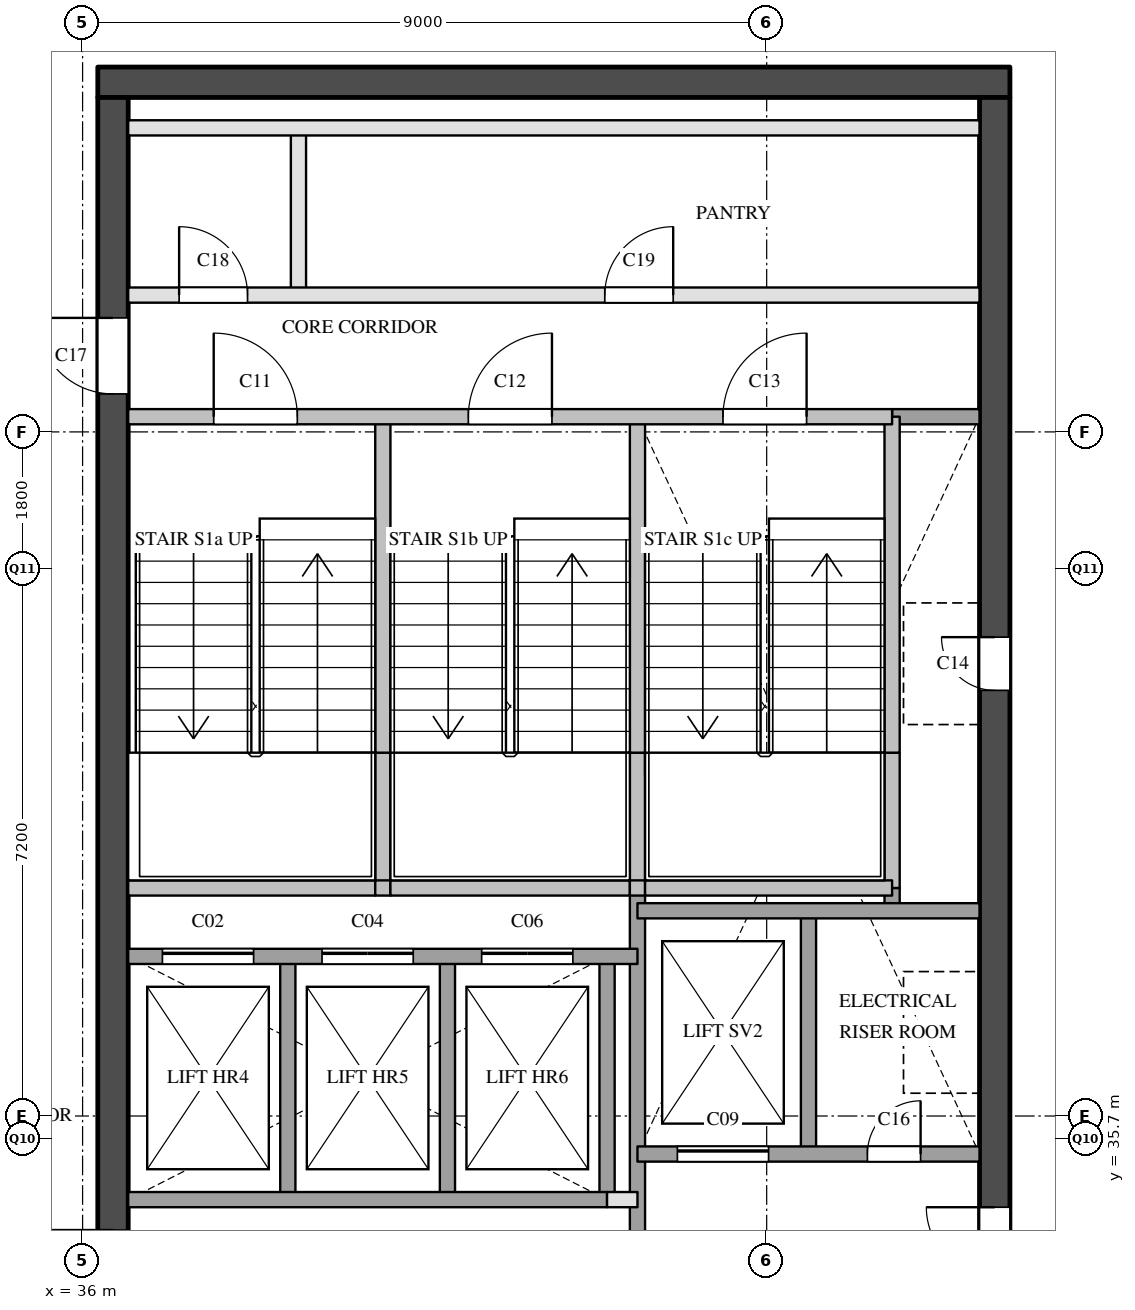
"""IFC4 building model, lengths in metres.
Left out: names, types, materials, properties, quantities, classifications, styles, units other than length and angle.
Written with IfcOpenShell. Run it as: python <this file> out.ifc"""

import sys

from ifc_helpers import new_model, si_unit, direction, frame, frame_2d, origin, place, context, subcontext, project, spatial, rectangle, extrude, element, fill, save


model = new_model("IFC4")
c1 = context("Model", 3, precision=1e-05, world=origin(), true_north=direction((0.0, 1.0)))
c2 = subcontext(c1, "Body", "Model", "MODEL_VIEW")
j1 = project(units=[si_unit("LENGTHUNIT", "METRE"), si_unit("PLANEANGLEUNIT", "RADIAN")], contexts=[c1])
p1 = place(None, origin())
s1 = spatial("IfcSite", under=j1, at=p1, CompositionType="ELEMENT")
p2 = place(p1, origin())
s2 = spatial("IfcBuilding", under=s1, at=p2, CompositionType="ELEMENT")
p3 = place(p2, frame((0.0, 0.0, 203.3)))
s3 = spatial("IfcBuildingStorey", under=s2, at=p3, CompositionType="ELEMENT", Elevation=203.3)
p4 = place(p3, frame((36.2, 49.6, 0.0), z_axis=(0.0, 0.0, 1.0), x_axis=(1.0, 0.0, 0.0)))
e1 = element("IfcWall", 1, at=p4, inside=s3, PredefinedType="SHEAR", context=c2, shape_type="SweptSolid", body=[
    extrude(rectangle(XDim=12.0, YDim=0.4, at=frame_2d((6.0, 0.0))), origin(), (0.0, 0.0, 1.0), 3.6),
])
p5 = place(p3, frame((36.4, 29.1, 0.0), z_axis=(0.0, 0.0, 1.0), x_axis=(0.0, 1.0, 0.0)))
e2 = element("IfcWall", 2, at=p5, inside=s3, PredefinedType="SHEAR", context=c2, shape_type="SweptSolid", body=[
    extrude(rectangle(XDim=20.3, YDim=0.4, at=frame_2d((10.15, 0.0))), origin(), (0.0, 0.0, 1.0), 3.6),
])
p6 = place(p5, frame((3.6, 0.0, 0.0)))
e3 = element("IfcOpeningElement", 3, at=p6, cuts=e2, PredefinedType="OPENING", context=c2, shape_type="SweptSolid", body=[
    extrude(rectangle(XDim=1.8, YDim=2.1, at=frame_2d((0.9, 1.05))), frame((0.0, 0.21, 0.0), z_axis=(0.0, -1.0, 0.0), x_axis=(1.0, 0.0, 0.0)), (0.0, 0.0, 1.0), 0.42),
])
p7 = place(p5, frame((16.4, 0.0, 0.0)))
e4 = element("IfcOpeningElement", 4, at=p7, cuts=e2, PredefinedType="OPENING", context=c2, shape_type="SweptSolid", body=[
    extrude(rectangle(XDim=1.0, YDim=2.1, at=frame_2d((0.5, 1.05))), frame((0.0, 0.21, 0.0), z_axis=(0.0, -1.0, 0.0), x_axis=(1.0, 0.0, 0.0)), (0.0, 0.0, 1.0), 0.42),
])
p8 = place(p3, frame((48.0, 29.1, 0.0), z_axis=(0.0, 0.0, 1.0), x_axis=(0.0, 1.0, 0.0)))
e5 = element("IfcWall", 5, at=p8, inside=s3, PredefinedType="SHEAR", context=c2, shape_type="SweptSolid", body=[
    extrude(rectangle(XDim=20.3, YDim=0.4, at=frame_2d((10.15, 0.0))), origin(), (0.0, 0.0, 1.0), 3.6),
])
p9 = place(p8, frame((12.5, 0.0, 0.0)))
e6 = element("IfcOpeningElement", 6, at=p9, cuts=e5, PredefinedType="OPENING", context=c2, shape_type="SweptSolid", body=[
    extrude(rectangle(XDim=0.7, YDim=2.1, at=frame_2d((0.35, 1.05))), frame((0.0, 0.21, 0.0), z_axis=(0.0, -1.0, 0.0), x_axis=(1.0, 0.0, 0.0)), (0.0, 0.0, 1.0), 0.42),
])
p10 = place(p8, frame((3.9, 0.0, 0.0)))
e7 = element("IfcOpeningElement", 7, at=p10, cuts=e5, PredefinedType="OPENING", context=c2, shape_type="SweptSolid", body=[
    extrude(rectangle(XDim=1.8, YDim=2.1, at=frame_2d((0.9, 1.05))), frame((0.0, 0.21, 0.0), z_axis=(0.0, -1.0, 0.0), x_axis=(1.0, 0.0, 0.0)), (0.0, 0.0, 1.0), 0.42),
])
p11 = place(p3, frame((38.7, 34.9, 0.0), z_axis=(0.0, 0.0, 1.0), x_axis=(0.0, 1.0, 0.0)))
e8 = element("IfcWall", 8, at=p11, inside=s3, PredefinedType="SOLIDWALL", context=c2, shape_type="SweptSolid", body=[
    extrude(rectangle(XDim=3.2, YDim=0.2, at=frame_2d((1.6, 0.0))), origin(), (0.0, 0.0, 1.0), 3.6),
])
p12 = place(p3, frame((38.84, 46.8, 0.0), z_axis=(0.0, 0.0, 1.0), x_axis=(0.0, 1.0, 0.0)))
e9 = element("IfcWall", 9, at=p12, inside=s3, PredefinedType="PARTITIONING", context=c2, shape_type="SweptSolid", body=[
    extrude(rectangle(XDim=2.2, YDim=0.2, at=frame_2d((1.1, 0.0))), origin(), (0.0, 0.0, 1.0), 3.6),
])
p13 = place(p3, frame((39.95, 39.0, 0.0), z_axis=(0.0, 0.0, 1.0), x_axis=(0.0, 1.0, 0.0)))
e10 = element("IfcWall", 10, at=p13, inside=s3, PredefinedType="SOLIDWALL", context=c2, shape_type="SweptSolid", body=[
    extrude(rectangle(XDim=1.78, YDim=0.2, at=frame_2d((0.89, 0.0))), origin(), (0.0, 0.0, 1.0), 3.6),
])
p14 = place(p3, frame((39.95, 40.78, 0.0), z_axis=(0.0, 0.0, 1.0), x_axis=(0.0, 1.0, 0.0)))
e11 = element("IfcWall", 11, at=p14, inside=s3, PredefinedType="SOLIDWALL", context=c2, shape_type="SweptSolid", body=[
    extrude(rectangle(XDim=4.42, YDim=0.2, at=frame_2d((2.21, 0.0))), origin(), (0.0, 0.0, 1.0), 3.6),
])
for number, where, z_axis, x_axis in (
    (12, (40.8, 34.9, 0.0), (0.0, 0.0, 1.0), (0.0, 1.0, 0.0)),
    (13, (42.9, 34.9, 0.0), (0.0, 0.0, 1.0), (0.0, 1.0, 0.0)),
):
    element("IfcWall", number, at=place(p3, frame(where, z_axis=z_axis, x_axis=x_axis)), inside=s3, PredefinedType="SOLIDWALL", context=c2, shape_type="SweptSolid", body=[
        extrude(rectangle(XDim=3.2, YDim=0.2, at=frame_2d((1.6, 0.0))), origin(), (0.0, 0.0, 1.0), 3.6),
    ])
p15 = place(p3, frame((43.3, 29.1, 0.0), z_axis=(0.0, 0.0, 1.0), x_axis=(0.0, 1.0, 0.0)))
e14 = element("IfcWall", 14, at=p15, inside=s3, PredefinedType="SOLIDWALL", context=c2, shape_type="SweptSolid", body=[
    extrude(rectangle(XDim=9.9, YDim=0.2, at=frame_2d((4.95, 0.0))), origin(), (0.0, 0.0, 1.0), 3.6),
])
p16 = place(p3, frame((43.3, 39.0, 0.0), z_axis=(0.0, 0.0, 1.0), x_axis=(0.0, 1.0, 0.0)))
e15 = element("IfcWall", 15, at=p16, inside=s3, PredefinedType="SOLIDWALL", context=c2, shape_type="SweptSolid", body=[
    extrude(rectangle(XDim=1.78, YDim=0.2, at=frame_2d((0.89, 0.0))), origin(), (0.0, 0.0, 1.0), 3.6),
])
p17 = place(p3, frame((43.3, 40.78, 0.0), z_axis=(0.0, 0.0, 1.0), x_axis=(0.0, 1.0, 0.0)))
e16 = element("IfcWall", 16, at=p17, inside=s3, PredefinedType="SOLIDWALL", context=c2, shape_type="SweptSolid", body=[
    extrude(rectangle(XDim=4.42, YDim=0.2, at=frame_2d((2.21, 0.0))), origin(), (0.0, 0.0, 1.0), 3.6),
])
p18 = place(p3, frame((45.55, 35.5, 0.0), z_axis=(0.0, 0.0, 1.0), x_axis=(0.0, 1.0, 0.0)))
e17 = element("IfcWall", 17, at=p18, inside=s3, PredefinedType="SOLIDWALL", context=c2, shape_type="SweptSolid", body=[
    extrude(rectangle(XDim=3.2, YDim=0.2, at=frame_2d((1.6, 0.0))), origin(), (0.0, 0.0, 1.0), 3.6),
])
p19 = place(p3, frame((46.65, 38.7, 0.0), z_axis=(0.0, 0.0, 1.0), x_axis=(0.0, 1.0, 0.0)))
e18 = element("IfcWall", 18, at=p19, inside=s3, PredefinedType="SOLIDWALL", context=c2, shape_type="SweptSolid", body=[
    extrude(rectangle(XDim=0.3, YDim=0.2, at=frame_2d((0.15, 0.0))), origin(), (0.0, 0.0, 1.0), 3.6),
])
p20 = place(p3, frame((46.65, 39.0, 0.0), z_axis=(0.0, 0.0, 1.0), x_axis=(0.0, 1.0, 0.0)))
e19 = element("IfcWall", 19, at=p20, inside=s3, PredefinedType="SOLIDWALL", context=c2, shape_type="SweptSolid", body=[
    extrude(rectangle(XDim=1.78, YDim=0.2, at=frame_2d((0.89, 0.0))), origin(), (0.0, 0.0, 1.0), 3.6),
])
p21 = place(p3, frame((46.65, 40.78, 0.0), z_axis=(0.0, 0.0, 1.0), x_axis=(0.0, 1.0, 0.0)))
e20 = element("IfcWall", 20, at=p21, inside=s3, PredefinedType="SOLIDWALL", context=c2, shape_type="SweptSolid", body=[
    extrude(rectangle(XDim=4.42, YDim=0.2, at=frame_2d((2.21, 0.0))), origin(), (0.0, 0.0, 1.0), 3.6),
])
p22 = place(p3, frame((42.9, 34.9, 0.0), z_axis=(0.0, 0.0, 1.0), x_axis=(1.0, 0.0, 0.0)))
e21 = element("IfcWall", 21, at=p22, inside=s3, PredefinedType="PARTITIONING", context=c2, shape_type="SweptSolid", body=[
    extrude(rectangle(XDim=0.4, YDim=0.2, at=frame_2d((0.2, 0.0))), origin(), (0.0, 0.0, 1.0), 3.6),
])
p23 = place(p3, frame((36.6, 34.9, 0.0), z_axis=(0.0, 0.0, 1.0), x_axis=(1.0, 0.0, 0.0)))
e22 = element("IfcWall", 22, at=p23, inside=s3, PredefinedType="SOLIDWALL", context=c2, shape_type="SweptSolid", body=[
    extrude(rectangle(XDim=6.3, YDim=0.2, at=frame_2d((3.15, 0.0))), origin(), (0.0, 0.0, 1.0), 3.6),
])
p24 = place(p3, frame((43.3, 35.5, 0.0), z_axis=(0.0, 0.0, 1.0), x_axis=(1.0, 0.0, 0.0)))
e23 = element("IfcWall", 23, at=p24, inside=s3, PredefinedType="SOLIDWALL", context=c2, shape_type="SweptSolid", body=[
    extrude(rectangle(XDim=4.5, YDim=0.2, at=frame_2d((2.25, 0.0))), origin(), (0.0, 0.0, 1.0), 3.6),
])
p25 = place(p24, frame((0.525, 0.0, 0.0)))
e24 = element("IfcOpeningElement", 24, at=p25, cuts=e23, PredefinedType="OPENING", context=c2, shape_type="SweptSolid", body=[
    extrude(rectangle(XDim=1.2, YDim=2.1, at=frame_2d((0.6, 1.05))), frame((0.0, 0.11, 0.0), z_axis=(0.0, -1.0, 0.0), x_axis=(1.0, 0.0, 0.0)), (0.0, 0.0, 1.0), 0.22),
])
p26 = place(p24, frame((3.025, 0.0, 0.0)))
e25 = element("IfcOpeningElement", 25, at=p26, cuts=e23, PredefinedType="OPENING", context=c2, shape_type="SweptSolid", body=[
    extrude(rectangle(XDim=0.7, YDim=2.1, at=frame_2d((0.35, 1.05))), frame((0.0, 0.11, 0.0), z_axis=(0.0, -1.0, 0.0), x_axis=(1.0, 0.0, 0.0)), (0.0, 0.0, 1.0), 0.22),
])
p27 = place(p3, frame((36.6, 38.1, 0.0), z_axis=(0.0, 0.0, 1.0), x_axis=(1.0, 0.0, 0.0)))
e26 = element("IfcWall", 26, at=p27, inside=s3, PredefinedType="SOLIDWALL", context=c2, shape_type="SweptSolid", body=[
    extrude(rectangle(XDim=6.7, YDim=0.2, at=frame_2d((3.35, 0.0))), origin(), (0.0, 0.0, 1.0), 3.6),
])
p28 = place(p27, frame((0.45, 0.0, 0.0)))
e27 = element("IfcOpeningElement", 27, at=p28, cuts=e26, PredefinedType="OPENING", context=c2, shape_type="SweptSolid", body=[
    extrude(rectangle(XDim=1.2, YDim=2.1, at=frame_2d((0.6, 1.05))), frame((0.0, 0.11, 0.0), z_axis=(0.0, -1.0, 0.0), x_axis=(1.0, 0.0, 0.0)), (0.0, 0.0, 1.0), 0.22),
])
p29 = place(p27, frame((2.55, 0.0, 0.0)))
e28 = element("IfcOpeningElement", 28, at=p29, cuts=e26, PredefinedType="OPENING", context=c2, shape_type="SweptSolid", body=[
    extrude(rectangle(XDim=1.2, YDim=2.1, at=frame_2d((0.6, 1.05))), frame((0.0, 0.11, 0.0), z_axis=(0.0, -1.0, 0.0), x_axis=(1.0, 0.0, 0.0)), (0.0, 0.0, 1.0), 0.22),
])
p30 = place(p27, frame((4.65, 0.0, 0.0)))
e29 = element("IfcOpeningElement", 29, at=p30, cuts=e26, PredefinedType="OPENING", context=c2, shape_type="SweptSolid", body=[
    extrude(rectangle(XDim=1.2, YDim=2.1, at=frame_2d((0.6, 1.05))), frame((0.0, 0.11, 0.0), z_axis=(0.0, -1.0, 0.0), x_axis=(1.0, 0.0, 0.0)), (0.0, 0.0, 1.0), 0.22),
])
p31 = place(p3, frame((43.3, 38.7, 0.0), z_axis=(0.0, 0.0, 1.0), x_axis=(1.0, 0.0, 0.0)))
e30 = element("IfcWall", 30, at=p31, inside=s3, PredefinedType="SOLIDWALL", context=c2, shape_type="SweptSolid", body=[
    extrude(rectangle(XDim=4.5, YDim=0.2, at=frame_2d((2.25, 0.0))), origin(), (0.0, 0.0, 1.0), 3.6),
])
p32 = place(p3, frame((36.6, 39.0, 0.0), z_axis=(0.0, 0.0, 1.0), x_axis=(1.0, 0.0, 0.0)))
e31 = element("IfcWall", 31, at=p32, inside=s3, PredefinedType="SOLIDWALL", context=c2, shape_type="SweptSolid", body=[
    extrude(rectangle(XDim=3.25, YDim=0.2, at=frame_2d((1.625, 0.0))), origin(), (0.0, 0.0, 1.0), 3.6),
])
p33 = place(p3, frame((39.85, 39.0, 0.0), z_axis=(0.0, 0.0, 1.0), x_axis=(1.0, 0.0, 0.0)))
e32 = element("IfcWall", 32, at=p33, inside=s3, PredefinedType="SOLIDWALL", context=c2, shape_type="SweptSolid", body=[
    extrude(rectangle(XDim=0.2, YDim=0.2, at=frame_2d((0.1, 0.0))), origin(), (0.0, 0.0, 1.0), 3.6),
])
p34 = place(p3, frame((40.05, 39.0, 0.0), z_axis=(0.0, 0.0, 1.0), x_axis=(1.0, 0.0, 0.0)))
e33 = element("IfcWall", 33, at=p34, inside=s3, PredefinedType="SOLIDWALL", context=c2, shape_type="SweptSolid", body=[
    extrude(rectangle(XDim=3.15, YDim=0.2, at=frame_2d((1.575, 0.0))), origin(), (0.0, 0.0, 1.0), 3.6),
])
p35 = place(p3, frame((43.2, 39.0, 0.0), z_axis=(0.0, 0.0, 1.0), x_axis=(1.0, 0.0, 0.0)))
e34 = element("IfcWall", 34, at=p35, inside=s3, PredefinedType="SOLIDWALL", context=c2, shape_type="SweptSolid", body=[
    extrude(rectangle(XDim=0.2, YDim=0.2, at=frame_2d((0.1, 0.0))), origin(), (0.0, 0.0, 1.0), 3.6),
])
p36 = place(p3, frame((43.4, 39.0, 0.0), z_axis=(0.0, 0.0, 1.0), x_axis=(1.0, 0.0, 0.0)))
e35 = element("IfcWall", 35, at=p36, inside=s3, PredefinedType="SOLIDWALL", context=c2, shape_type="SweptSolid", body=[
    extrude(rectangle(XDim=3.25, YDim=0.2, at=frame_2d((1.625, 0.0))), origin(), (0.0, 0.0, 1.0), 3.6),
])
p37 = place(p3, frame((46.65, 45.2, 0.0), z_axis=(0.0, 0.0, 1.0), x_axis=(1.0, 0.0, 0.0)))
e36 = element("IfcWall", 36, at=p37, inside=s3, PredefinedType="SOLIDWALL", context=c2, shape_type="SweptSolid", body=[
    extrude(rectangle(XDim=1.15, YDim=0.2, at=frame_2d((0.575, 0.0))), origin(), (0.0, 0.0, 1.0), 3.6),
])
p38 = place(p3, frame((36.6, 45.2, 0.0), z_axis=(0.0, 0.0, 1.0), x_axis=(1.0, 0.0, 0.0)))
e37 = element("IfcWall", 37, at=p38, inside=s3, PredefinedType="SOLIDWALL", context=c2, shape_type="SweptSolid", body=[
    extrude(rectangle(XDim=10.05, YDim=0.2, at=frame_2d((5.025, 0.0))), origin(), (0.0, 0.0, 1.0), 3.6),
])
p39 = place(p38, frame((1.125, 0.0, 0.0)))
e38 = element("IfcOpeningElement", 38, at=p39, cuts=e37, PredefinedType="OPENING", context=c2, shape_type="SweptSolid", body=[
    extrude(rectangle(XDim=1.1, YDim=2.1, at=frame_2d((0.55, 1.05))), frame((0.0, 0.11, 0.0), z_axis=(0.0, -1.0, 0.0), x_axis=(1.0, 0.0, 0.0)), (0.0, 0.0, 1.0), 0.22),
])
p40 = place(p38, frame((4.475, 0.0, 0.0)))
e39 = element("IfcOpeningElement", 39, at=p40, cuts=e37, PredefinedType="OPENING", context=c2, shape_type="SweptSolid", body=[
    extrude(rectangle(XDim=1.1, YDim=2.1, at=frame_2d((0.55, 1.05))), frame((0.0, 0.11, 0.0), z_axis=(0.0, -1.0, 0.0), x_axis=(1.0, 0.0, 0.0)), (0.0, 0.0, 1.0), 0.22),
])
p41 = place(p38, frame((7.825, 0.0, 0.0)))
e40 = element("IfcOpeningElement", 40, at=p41, cuts=e37, PredefinedType="OPENING", context=c2, shape_type="SweptSolid", body=[
    extrude(rectangle(XDim=1.1, YDim=2.1, at=frame_2d((0.55, 1.05))), frame((0.0, 0.11, 0.0), z_axis=(0.0, -1.0, 0.0), x_axis=(1.0, 0.0, 0.0)), (0.0, 0.0, 1.0), 0.22),
])
p42 = place(p3, frame((36.6, 46.8, 0.0), z_axis=(0.0, 0.0, 1.0), x_axis=(1.0, 0.0, 0.0)))
e41 = element("IfcWall", 41, at=p42, inside=s3, PredefinedType="PARTITIONING", context=c2, shape_type="SweptSolid", body=[
    extrude(rectangle(XDim=11.2, YDim=0.2, at=frame_2d((5.6, 0.0))), origin(), (0.0, 0.0, 1.0), 3.6),
])
p43 = place(p42, frame((0.67, 0.0, 0.0)))
e42 = element("IfcOpeningElement", 42, at=p43, cuts=e41, PredefinedType="OPENING", context=c2, shape_type="SweptSolid", body=[
    extrude(rectangle(XDim=0.9, YDim=2.1, at=frame_2d((0.45, 1.05))), frame((0.0, 0.11, 0.0), z_axis=(0.0, -1.0, 0.0), x_axis=(1.0, 0.0, 0.0)), (0.0, 0.0, 1.0), 0.22),
])
p44 = place(p42, frame((6.27, 0.0, 0.0)))
e43 = element("IfcOpeningElement", 43, at=p44, cuts=e41, PredefinedType="OPENING", context=c2, shape_type="SweptSolid", body=[
    extrude(rectangle(XDim=0.9, YDim=2.1, at=frame_2d((0.45, 1.05))), frame((0.0, 0.11, 0.0), z_axis=(0.0, -1.0, 0.0), x_axis=(1.0, 0.0, 0.0)), (0.0, 0.0, 1.0), 0.22),
])
p45 = place(p3, frame((36.6, 49.0, 0.0), z_axis=(0.0, 0.0, 1.0), x_axis=(1.0, 0.0, 0.0)))
e44 = element("IfcWall", 44, at=p45, inside=s3, PredefinedType="PARTITIONING", context=c2, shape_type="SweptSolid", body=[
    extrude(rectangle(XDim=11.2, YDim=0.2, at=frame_2d((5.6, 0.0))), origin(), (0.0, 0.0, 1.0), 3.6),
])
p46 = place(p28, origin())
e45 = element("IfcDoor", 45, at=p46, inside=s3, OperationType="SLIDING_TO_LEFT", PredefinedType="DOOR", context=c2, shape_type="SweptSolid", body=[
    extrude(rectangle(XDim=1.2, YDim=2.1, at=frame_2d((0.6, 1.05))), frame((0.0, 0.025, 0.0), z_axis=(0.0, -1.0, 0.0), x_axis=(1.0, 0.0, 0.0)), (0.0, 0.0, 1.0), 0.05),
])
fill(e27, e45)
p47 = place(p29, origin())
e46 = element("IfcDoor", 46, at=p47, inside=s3, OperationType="SLIDING_TO_LEFT", PredefinedType="DOOR", context=c2, shape_type="SweptSolid", body=[
    extrude(rectangle(XDim=1.2, YDim=2.1, at=frame_2d((0.6, 1.05))), frame((0.0, 0.025, 0.0), z_axis=(0.0, -1.0, 0.0), x_axis=(1.0, 0.0, 0.0)), (0.0, 0.0, 1.0), 0.05),
])
fill(e28, e46)
p48 = place(p30, origin())
e47 = element("IfcDoor", 47, at=p48, inside=s3, OperationType="SLIDING_TO_LEFT", PredefinedType="DOOR", context=c2, shape_type="SweptSolid", body=[
    extrude(rectangle(XDim=1.2, YDim=2.1, at=frame_2d((0.6, 1.05))), frame((0.0, 0.025, 0.0), z_axis=(0.0, -1.0, 0.0), x_axis=(1.0, 0.0, 0.0)), (0.0, 0.0, 1.0), 0.05),
])
fill(e29, e47)
p49 = place(p25, origin())
e48 = element("IfcDoor", 48, at=p49, inside=s3, OperationType="SLIDING_TO_LEFT", PredefinedType="DOOR", context=c2, shape_type="SweptSolid", body=[
    extrude(rectangle(XDim=1.2, YDim=2.1, at=frame_2d((0.6, 1.05))), frame((0.0, 0.025, 0.0), z_axis=(0.0, -1.0, 0.0), x_axis=(1.0, 0.0, 0.0)), (0.0, 0.0, 1.0), 0.05),
])
fill(e24, e48)
p50 = place(p6, origin())
e49 = element("IfcDoor", 49, at=p50, inside=s3, OperationType="DOUBLE_DOOR_SINGLE_SWING", PredefinedType="DOOR", context=c2, shape_type="SweptSolid", body=[
    extrude(rectangle(XDim=1.8, YDim=2.1, at=frame_2d((0.9, 1.05))), frame((0.0, 0.025, 0.0), z_axis=(0.0, -1.0, 0.0), x_axis=(1.0, 0.0, 0.0)), (0.0, 0.0, 1.0), 0.05),
])
fill(e3, e49)
p51 = place(p39, origin())
e50 = element("IfcDoor", 50, at=p51, inside=s3, OperationType="SINGLE_SWING_LEFT", PredefinedType="DOOR", context=c2, shape_type="SweptSolid", body=[
    extrude(rectangle(XDim=1.1, YDim=2.1, at=frame_2d((0.55, 1.05))), frame((0.0, 0.025, 0.0), z_axis=(0.0, -1.0, 0.0), x_axis=(1.0, 0.0, 0.0)), (0.0, 0.0, 1.0), 0.05),
])
fill(e38, e50)
p52 = place(p40, origin())
e51 = element("IfcDoor", 51, at=p52, inside=s3, OperationType="SINGLE_SWING_RIGHT", PredefinedType="DOOR", context=c2, shape_type="SweptSolid", body=[
    extrude(rectangle(XDim=1.1, YDim=2.1, at=frame_2d((0.55, 1.05))), frame((0.0, 0.025, 0.0), z_axis=(0.0, -1.0, 0.0), x_axis=(1.0, 0.0, 0.0)), (0.0, 0.0, 1.0), 0.05),
])
fill(e39, e51)
p53 = place(p41, origin())
e52 = element("IfcDoor", 52, at=p53, inside=s3, OperationType="SINGLE_SWING_RIGHT", PredefinedType="DOOR", context=c2, shape_type="SweptSolid", body=[
    extrude(rectangle(XDim=1.1, YDim=2.1, at=frame_2d((0.55, 1.05))), frame((0.0, 0.025, 0.0), z_axis=(0.0, -1.0, 0.0), x_axis=(1.0, 0.0, 0.0)), (0.0, 0.0, 1.0), 0.05),
])
fill(e40, e52)
p54 = place(p9, origin())
e53 = element("IfcDoor", 53, at=p54, inside=s3, OperationType="SINGLE_SWING_RIGHT", PredefinedType="DOOR", context=c2, shape_type="SweptSolid", body=[
    extrude(rectangle(XDim=0.7, YDim=2.1, at=frame_2d((0.35, 1.05))), frame((0.0, 0.025, 0.0), z_axis=(0.0, -1.0, 0.0), x_axis=(1.0, 0.0, 0.0)), (0.0, 0.0, 1.0), 0.05),
])
fill(e6, e53)
p55 = place(p10, origin())
e54 = element("IfcDoor", 54, at=p55, inside=s3, OperationType="DOUBLE_DOOR_SINGLE_SWING", PredefinedType="DOOR", context=c2, shape_type="SweptSolid", body=[
    extrude(rectangle(XDim=1.8, YDim=2.1, at=frame_2d((0.9, 1.05))), frame((0.0, 0.025, 0.0), z_axis=(0.0, -1.0, 0.0), x_axis=(1.0, 0.0, 0.0)), (0.0, 0.0, 1.0), 0.05),
])
fill(e7, e54)
p56 = place(p26, origin())
e55 = element("IfcDoor", 55, at=p56, inside=s3, OperationType="SINGLE_SWING_RIGHT", PredefinedType="DOOR", context=c2, shape_type="SweptSolid", body=[
    extrude(rectangle(XDim=0.7, YDim=2.1, at=frame_2d((0.35, 1.05))), frame((0.0, 0.025, 0.0), z_axis=(0.0, -1.0, 0.0), x_axis=(1.0, 0.0, 0.0)), (0.0, 0.0, 1.0), 0.05),
])
fill(e25, e55)
p57 = place(p7, origin())
e56 = element("IfcDoor", 56, at=p57, inside=s3, OperationType="SINGLE_SWING_RIGHT", PredefinedType="DOOR", context=c2, shape_type="SweptSolid", body=[
    extrude(rectangle(XDim=1.0, YDim=2.1, at=frame_2d((0.5, 1.05))), frame((0.0, 0.025, 0.0), z_axis=(0.0, -1.0, 0.0), x_axis=(1.0, 0.0, 0.0)), (0.0, 0.0, 1.0), 0.05),
])
fill(e4, e56)
p58 = place(p43, origin())
e57 = element("IfcDoor", 57, at=p58, inside=s3, OperationType="SINGLE_SWING_LEFT", PredefinedType="DOOR", context=c2, shape_type="SweptSolid", body=[
    extrude(rectangle(XDim=0.9, YDim=2.1, at=frame_2d((0.45, 1.05))), frame((0.0, 0.025, 0.0), z_axis=(0.0, -1.0, 0.0), x_axis=(1.0, 0.0, 0.0)), (0.0, 0.0, 1.0), 0.05),
])
fill(e42, e57)
p59 = place(p44, origin())
e58 = element("IfcDoor", 58, at=p59, inside=s3, OperationType="SINGLE_SWING_RIGHT", PredefinedType="DOOR", context=c2, shape_type="SweptSolid", body=[
    extrude(rectangle(XDim=0.9, YDim=2.1, at=frame_2d((0.45, 1.05))), frame((0.0, 0.025, 0.0), z_axis=(0.0, -1.0, 0.0), x_axis=(1.0, 0.0, 0.0)), (0.0, 0.0, 1.0), 0.05),
])
fill(e43, e58)
save(model, sys.argv[1])
